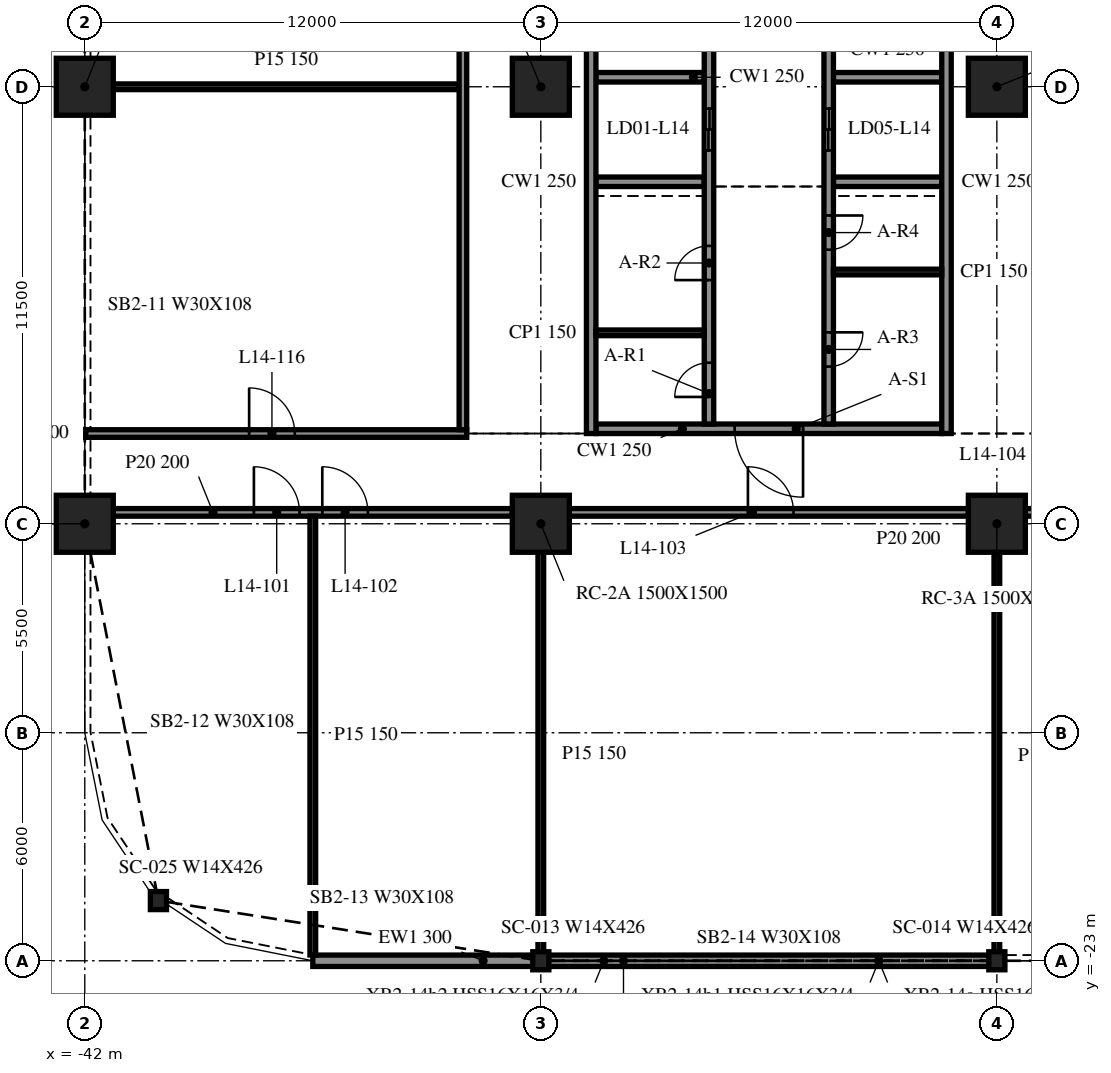
"""IFC4 building model, lengths in metres.
Left out: names, types, materials, properties, quantities, classifications, styles, units other than length and angle.
Written with IfcOpenShell. Run it as: python <this file> out.ifc"""

import sys

from ifc_helpers import new_model, si_unit, direction, frame, frame_2d, origin, origin_2d, place, context, subcontext, project, spatial, rectangle, i_section, extrude, element, fill, save


model = new_model("IFC4")
c1 = context("Model", 3, precision=1e-05, world=origin(), true_north=direction((0.0, 1.0)))
c2 = subcontext(c1, "Body", "Model", "MODEL_VIEW")
j1 = project(units=[si_unit("LENGTHUNIT", "METRE"), si_unit("PLANEANGLEUNIT", "RADIAN")], contexts=[c1])
p1 = place(None, origin())
s1 = spatial("IfcSite", under=j1, at=p1, CompositionType="ELEMENT")
p2 = place(p1, origin())
s2 = spatial("IfcBuilding", under=s1, at=p2, CompositionType="ELEMENT")
p3 = place(p2, frame((0.0, 0.0, 63.2)))
s3 = spatial("IfcBuildingStorey", under=s2, at=p3, CompositionType="ELEMENT", Elevation=63.2)
for number, where, z_axis, x_axis in (
    (1, (-42.0, -11.5, -0.34), (0.0, 0.0, 1.0), (1.0, 0.0, 0.0)),
    (2, (-42.0, 0.0, -0.34), (0.0, 0.0, 1.0), (1.0, 0.0, 0.0)),
    (3, (-30.0, -11.5, -0.34), (0.0, 0.0, 1.0), (1.0, 0.0, 0.0)),
    (4, (-30.0, 0.0, -0.34), (0.0, 0.0, 1.0), (1.0, 0.0, 0.0)),
    (5, (-18.0, -11.5, -0.34), (0.0, 0.0, 1.0), (1.0, 0.0, 0.0)),
    (6, (-18.0, 0.0, -0.34), (0.0, 0.0, 1.0), (1.0, 0.0, 0.0)),
):
    element("IfcColumn", number, at=place(p3, frame(where, z_axis=z_axis, x_axis=x_axis)), inside=s3, PredefinedType="COLUMN", context=c2, shape_type="SweptSolid", body=[
        extrude(rectangle(XDim=1.5, YDim=1.5, at=origin_2d()), origin(), (0.0, 0.0, 1.0), 4.3),
    ])
for number, where, z_axis, x_axis in (
    (7, (-40.062, -21.416, -0.34), (0.0, 0.0, 1.0), (1.0, 0.0, 0.0)),
    (8, (-30.0, -23.0, -0.34), (0.0, 0.0, 1.0), (1.0, 0.0, 0.0)),
    (9, (-18.0, -23.0, -0.34), (0.0, 0.0, 1.0), (1.0, 0.0, 0.0)),
):
    element("IfcColumn", number, at=place(p3, frame(where, z_axis=z_axis, x_axis=x_axis)), inside=s3, PredefinedType="COLUMN", context=c2, shape_type="SweptSolid", body=[
        extrude(i_section(OverallWidth=0.424, OverallDepth=0.475, WebThickness=0.048, FlangeThickness=0.077, at=origin_2d()), origin(), (0.0, 0.0, 1.0), 4.3),
    ])
p4 = place(p3, frame((-36.0, -23.0, 0.0), z_axis=(0.0, 0.0, 1.0), x_axis=(1.0, 0.0, 0.0)))
e10 = element("IfcWall", 10, at=p4, inside=s3, PredefinedType="NOTDEFINED", context=c2, shape_type="SweptSolid", body=[
    extrude(rectangle(XDim=5.976, YDim=0.3, at=frame_2d((2.988, 0.0))), origin(), (0.0, 0.0, 1.0), 3.203),
])
p5 = place(p3, frame((-29.976, -23.0, 0.0), z_axis=(0.0, 0.0, 1.0), x_axis=(1.0, 0.0, 0.0)))
e11 = element("IfcWall", 11, at=p5, inside=s3, PredefinedType="NOTDEFINED", context=c2, shape_type="SweptSolid", body=[
    extrude(rectangle(XDim=11.952, YDim=0.3, at=frame_2d((5.976, 0.0))), origin(), (0.0, 0.0, 1.0), 3.203),
])
for number, where, z_axis, x_axis in (
    (12, (-28.675, 15.125, 0.0), (0.0, 0.0, 1.0), (0.0, -1.0, 0.0)),
    (13, (-19.325, -9.125, 0.0), (0.0, 0.0, 1.0), (0.0, 1.0, 0.0)),
):
    element("IfcWall", number, at=place(p3, frame(where, z_axis=z_axis, x_axis=x_axis)), inside=s3, PredefinedType="SOLIDWALL", context=c2, shape_type="SweptSolid", body=[
        extrude(rectangle(XDim=24.25, YDim=0.25, at=frame_2d((12.125, 0.0))), origin(), (0.0, 0.0, 1.0), 3.96),
    ])
p6 = place(p3, frame((-19.45, -9.0, 0.0), z_axis=(0.0, 0.0, 1.0), x_axis=(-1.0, 0.0, 0.0)))
e14 = element("IfcWall", 14, at=p6, inside=s3, PredefinedType="SOLIDWALL", context=c2, shape_type="SweptSolid", body=[
    extrude(rectangle(XDim=9.1, YDim=0.25, at=frame_2d((4.55, 0.0))), origin(), (0.0, 0.0, 1.0), 3.96),
])
p7 = place(p6, frame((3.65, 0.0, 0.0)))
e15 = element("IfcOpeningElement", 15, at=p7, cuts=e14, PredefinedType="OPENING", context=c2, shape_type="SweptSolid", body=[
    extrude(rectangle(XDim=1.8, YDim=2.1, at=frame_2d((0.9, 1.05))), frame((0.0, 0.135, 0.0), z_axis=(0.0, -1.0, 0.0), x_axis=(1.0, 0.0, 0.0)), (0.0, 0.0, 1.0), 0.27),
])
p8 = place(p3, frame((-25.575, -8.875, 0.0), z_axis=(0.0, 0.0, 1.0), x_axis=(0.0, 1.0, 0.0)))
e16 = element("IfcWall", 16, at=p8, inside=s3, PredefinedType="SOLIDWALL", context=c2, shape_type="SweptSolid", body=[
    extrude(rectangle(XDim=17.5, YDim=0.25, at=frame_2d((8.75, 0.0))), origin(), (0.0, 0.0, 1.0), 3.96),
])
p9 = place(p8, frame((7.2, 0.0, 0.0)))
e17 = element("IfcOpeningElement", 17, at=p9, cuts=e16, PredefinedType="OPENING", context=c2, shape_type="SweptSolid", body=[
    extrude(rectangle(XDim=1.1, YDim=2.1, at=frame_2d((0.55, 1.05))), frame((0.0, 0.135, 0.0), z_axis=(0.0, -1.0, 0.0), x_axis=(1.0, 0.0, 0.0)), (0.0, 0.0, 1.0), 0.27),
])
p10 = place(p8, frame((9.95, 0.0, 0.0)))
e18 = element("IfcOpeningElement", 18, at=p10, cuts=e16, PredefinedType="OPENING", context=c2, shape_type="SweptSolid", body=[
    extrude(rectangle(XDim=1.1, YDim=2.1, at=frame_2d((0.55, 1.05))), frame((0.0, 0.135, 0.0), z_axis=(0.0, -1.0, 0.0), x_axis=(1.0, 0.0, 0.0)), (0.0, 0.0, 1.0), 0.27),
])
p11 = place(p8, frame((12.7, 0.0, 0.0)))
e19 = element("IfcOpeningElement", 19, at=p11, cuts=e16, PredefinedType="OPENING", context=c2, shape_type="SweptSolid", body=[
    extrude(rectangle(XDim=1.1, YDim=2.1, at=frame_2d((0.55, 1.05))), frame((0.0, 0.135, 0.0), z_axis=(0.0, -1.0, 0.0), x_axis=(1.0, 0.0, 0.0)), (0.0, 0.0, 1.0), 0.27),
])
p12 = place(p8, frame((15.45, 0.0, 0.0)))
e20 = element("IfcOpeningElement", 20, at=p12, cuts=e16, PredefinedType="OPENING", context=c2, shape_type="SweptSolid", body=[
    extrude(rectangle(XDim=1.1, YDim=2.1, at=frame_2d((0.55, 1.05))), frame((0.0, 0.135, 0.0), z_axis=(0.0, -1.0, 0.0), x_axis=(1.0, 0.0, 0.0)), (0.0, 0.0, 1.0), 0.27),
])
p13 = place(p8, frame((0.712, 0.0, 0.0)))
e21 = element("IfcOpeningElement", 21, at=p13, cuts=e16, PredefinedType="OPENING", context=c2, shape_type="SweptSolid", body=[
    extrude(rectangle(XDim=0.9, YDim=2.1, at=frame_2d((0.45, 1.05))), frame((0.0, 0.135, 0.0), z_axis=(0.0, -1.0, 0.0), x_axis=(1.0, 0.0, 0.0)), (0.0, 0.0, 1.0), 0.27),
])
p14 = place(p8, frame((3.788, 0.0, 0.0)))
e22 = element("IfcOpeningElement", 22, at=p14, cuts=e16, PredefinedType="OPENING", context=c2, shape_type="SweptSolid", body=[
    extrude(rectangle(XDim=0.9, YDim=2.1, at=frame_2d((0.45, 1.05))), frame((0.0, 0.135, 0.0), z_axis=(0.0, -1.0, 0.0), x_axis=(1.0, 0.0, 0.0)), (0.0, 0.0, 1.0), 0.27),
])
p15 = place(p3, frame((-22.425, 14.875, 0.0), z_axis=(0.0, 0.0, 1.0), x_axis=(0.0, -1.0, 0.0)))
e23 = element("IfcWall", 23, at=p15, inside=s3, PredefinedType="SOLIDWALL", context=c2, shape_type="SweptSolid", body=[
    extrude(rectangle(XDim=23.75, YDim=0.25, at=frame_2d((11.875, 0.0))), origin(), (0.0, 0.0, 1.0), 3.96),
])
p16 = place(p15, frame((15.45, 0.0, 0.0)))
e24 = element("IfcOpeningElement", 24, at=p16, cuts=e23, PredefinedType="OPENING", context=c2, shape_type="SweptSolid", body=[
    extrude(rectangle(XDim=1.1, YDim=2.1, at=frame_2d((0.55, 1.05))), frame((0.0, 0.135, 0.0), z_axis=(0.0, -1.0, 0.0), x_axis=(1.0, 0.0, 0.0)), (0.0, 0.0, 1.0), 0.27),
])
p17 = place(p15, frame((12.7, 0.0, 0.0)))
e25 = element("IfcOpeningElement", 25, at=p17, cuts=e23, PredefinedType="OPENING", context=c2, shape_type="SweptSolid", body=[
    extrude(rectangle(XDim=1.1, YDim=2.1, at=frame_2d((0.55, 1.05))), frame((0.0, 0.135, 0.0), z_axis=(0.0, -1.0, 0.0), x_axis=(1.0, 0.0, 0.0)), (0.0, 0.0, 1.0), 0.27),
])
p18 = place(p15, frame((21.337, 0.0, 0.0)))
e26 = element("IfcOpeningElement", 26, at=p18, cuts=e23, PredefinedType="OPENING", context=c2, shape_type="SweptSolid", body=[
    extrude(rectangle(XDim=0.9, YDim=2.1, at=frame_2d((0.45, 1.05))), frame((0.0, 0.135, 0.0), z_axis=(0.0, -1.0, 0.0), x_axis=(1.0, 0.0, 0.0)), (0.0, 0.0, 1.0), 0.27),
])
p19 = place(p15, frame((18.262, 0.0, 0.0)))
e27 = element("IfcOpeningElement", 27, at=p19, cuts=e23, PredefinedType="OPENING", context=c2, shape_type="SweptSolid", body=[
    extrude(rectangle(XDim=0.9, YDim=2.1, at=frame_2d((0.45, 1.05))), frame((0.0, 0.135, 0.0), z_axis=(0.0, -1.0, 0.0), x_axis=(1.0, 0.0, 0.0)), (0.0, 0.0, 1.0), 0.27),
])
p20 = place(p15, frame((4.387, 0.0, 0.0)))
e28 = element("IfcOpeningElement", 28, at=p20, cuts=e23, PredefinedType="OPENING", context=c2, shape_type="SweptSolid", body=[
    extrude(rectangle(XDim=0.9, YDim=2.1, at=frame_2d((0.45, 1.05))), frame((0.0, 0.135, 0.0), z_axis=(0.0, -1.0, 0.0), x_axis=(1.0, 0.0, 0.0)), (0.0, 0.0, 1.0), 0.27),
])
p21 = place(p15, frame((1.312, 0.0, 0.0)))
e29 = element("IfcOpeningElement", 29, at=p21, cuts=e23, PredefinedType="OPENING", context=c2, shape_type="SweptSolid", body=[
    extrude(rectangle(XDim=0.9, YDim=2.1, at=frame_2d((0.45, 1.05))), frame((0.0, 0.135, 0.0), z_axis=(0.0, -1.0, 0.0), x_axis=(1.0, 0.0, 0.0)), (0.0, 0.0, 1.0), 0.27),
])
for number, where, z_axis, x_axis in (
    (30, (-28.55, -2.5, 0.0), (0.0, 0.0, 1.0), (1.0, 0.0, 0.0)),
    (31, (-28.55, 0.25, 0.0), (0.0, 0.0, 1.0), (1.0, 0.0, 0.0)),
    (32, (-22.3, -2.5, 0.0), (0.0, 0.0, 1.0), (1.0, 0.0, 0.0)),
    (33, (-22.3, 0.25, 0.0), (0.0, 0.0, 1.0), (1.0, 0.0, 0.0)),
):
    element("IfcWall", number, at=place(p3, frame(where, z_axis=z_axis, x_axis=x_axis)), inside=s3, PredefinedType="SOLIDWALL", context=c2, shape_type="SweptSolid", body=[
        extrude(rectangle(XDim=2.85, YDim=0.25, at=frame_2d((1.425, 0.0))), origin(), (0.0, 0.0, 1.0), 3.96),
    ])
for number, where, z_axis, x_axis in (
    (34, (-28.55, -6.475, 0.0), (0.0, 0.0, 1.0), (1.0, 0.0, 0.0)),
    (35, (-22.3, -4.875, 0.0), (0.0, 0.0, 1.0), (1.0, 0.0, 0.0)),
):
    element("IfcWall", number, at=place(p3, frame(where, z_axis=z_axis, x_axis=x_axis)), inside=s3, PredefinedType="PARTITIONING", context=c2, shape_type="SweptSolid", body=[
        extrude(rectangle(XDim=2.85, YDim=0.15, at=frame_2d((1.425, 0.0))), origin(), (0.0, 0.0, 1.0), 3.96),
    ])
p22 = place(p3, frame((-41.25, -11.2, 0.0), z_axis=(0.0, 0.0, 1.0), x_axis=(1.0, 0.0, 0.0)))
e36 = element("IfcWall", 36, at=p22, inside=s3, PredefinedType="PARTITIONING", context=c2, shape_type="SweptSolid", body=[
    extrude(rectangle(XDim=10.5, YDim=0.2, at=frame_2d((5.25, 0.0))), origin(), (0.0, 0.0, 1.0), 3.96),
])
p23 = place(p22, frame((3.7, 0.0, 0.0)))
e37 = element("IfcOpeningElement", 37, at=p23, cuts=e36, PredefinedType="OPENING", context=c2, shape_type="SweptSolid", body=[
    extrude(rectangle(XDim=1.2, YDim=2.1, at=frame_2d((0.6, 1.05))), frame((0.0, 0.11, 0.0), z_axis=(0.0, -1.0, 0.0), x_axis=(1.0, 0.0, 0.0)), (0.0, 0.0, 1.0), 0.22),
])
p24 = place(p22, frame((5.5, 0.0, 0.0)))
e38 = element("IfcOpeningElement", 38, at=p24, cuts=e36, PredefinedType="OPENING", context=c2, shape_type="SweptSolid", body=[
    extrude(rectangle(XDim=1.2, YDim=2.1, at=frame_2d((0.6, 1.05))), frame((0.0, 0.11, 0.0), z_axis=(0.0, -1.0, 0.0), x_axis=(1.0, 0.0, 0.0)), (0.0, 0.0, 1.0), 0.22),
])
p25 = place(p3, frame((-29.25, -11.2, 0.0), z_axis=(0.0, 0.0, 1.0), x_axis=(1.0, 0.0, 0.0)))
e39 = element("IfcWall", 39, at=p25, inside=s3, PredefinedType="PARTITIONING", context=c2, shape_type="SweptSolid", body=[
    extrude(rectangle(XDim=10.5, YDim=0.2, at=frame_2d((5.25, 0.0))), origin(), (0.0, 0.0, 1.0), 3.96),
])
p26 = place(p25, frame((4.7, 0.0, 0.0)))
e40 = element("IfcOpeningElement", 40, at=p26, cuts=e39, PredefinedType="OPENING", context=c2, shape_type="SweptSolid", body=[
    extrude(rectangle(XDim=1.2, YDim=2.1, at=frame_2d((0.6, 1.05))), frame((0.0, 0.11, 0.0), z_axis=(0.0, -1.0, 0.0), x_axis=(1.0, 0.0, 0.0)), (0.0, 0.0, 1.0), 0.22),
])
p27 = place(p3, frame((-17.25, -11.2, 0.0), z_axis=(0.0, 0.0, 1.0), x_axis=(1.0, 0.0, 0.0)))
e41 = element("IfcWall", 41, at=p27, inside=s3, PredefinedType="PARTITIONING", context=c2, shape_type="SweptSolid", body=[
    extrude(rectangle(XDim=10.5, YDim=0.2, at=frame_2d((5.25, 0.0))), origin(), (0.0, 0.0, 1.0), 3.96),
])
p28 = place(p27, frame((0.9, 0.0, 0.0)))
e42 = element("IfcOpeningElement", 42, at=p28, cuts=e41, PredefinedType="OPENING", context=c2, shape_type="SweptSolid", body=[
    extrude(rectangle(XDim=1.0, YDim=2.1, at=frame_2d((0.5, 1.05))), frame((0.0, 0.11, 0.0), z_axis=(0.0, -1.0, 0.0), x_axis=(1.0, 0.0, 0.0)), (0.0, 0.0, 1.0), 0.22),
])
p29 = place(p27, frame((3.7, 0.0, 0.0)))
e43 = element("IfcOpeningElement", 43, at=p29, cuts=e41, PredefinedType="OPENING", context=c2, shape_type="SweptSolid", body=[
    extrude(rectangle(XDim=1.2, YDim=2.1, at=frame_2d((0.6, 1.05))), frame((0.0, 0.11, 0.0), z_axis=(0.0, -1.0, 0.0), x_axis=(1.0, 0.0, 0.0)), (0.0, 0.0, 1.0), 0.22),
])
p30 = place(p27, frame((5.5, 0.0, 0.0)))
e44 = element("IfcOpeningElement", 44, at=p30, cuts=e41, PredefinedType="OPENING", context=c2, shape_type="SweptSolid", body=[
    extrude(rectangle(XDim=1.2, YDim=2.1, at=frame_2d((0.6, 1.05))), frame((0.0, 0.11, 0.0), z_axis=(0.0, -1.0, 0.0), x_axis=(1.0, 0.0, 0.0)), (0.0, 0.0, 1.0), 0.22),
])
p31 = place(p3, frame((-41.975, -9.125, 0.0), z_axis=(0.0, 0.0, 1.0), x_axis=(1.0, 0.0, 0.0)))
e45 = element("IfcWall", 45, at=p31, inside=s3, PredefinedType="PARTITIONING", context=c2, shape_type="SweptSolid", body=[
    extrude(rectangle(XDim=10.025, YDim=0.2, at=frame_2d((5.013, 0.0))), origin(), (0.0, 0.0, 1.0), 3.96),
])
p32 = place(p31, frame((4.3, 0.0, 0.0)))
e46 = element("IfcOpeningElement", 46, at=p32, cuts=e45, PredefinedType="OPENING", context=c2, shape_type="SweptSolid", body=[
    extrude(rectangle(XDim=1.2, YDim=2.1, at=frame_2d((0.6, 1.05))), frame((0.0, 0.11, 0.0), z_axis=(0.0, -1.0, 0.0), x_axis=(1.0, 0.0, 0.0)), (0.0, 0.0, 1.0), 0.22),
])
p33 = place(p3, frame((-41.25, 0.0, 0.0), z_axis=(0.0, 0.0, 1.0), x_axis=(1.0, 0.0, 0.0)))
e47 = element("IfcWall", 47, at=p33, inside=s3, PredefinedType="PARTITIONING", context=c2, shape_type="SweptSolid", body=[
    extrude(rectangle(XDim=9.1, YDim=0.15, at=frame_2d((4.55, 0.0))), origin(), (0.0, 0.0, 1.0), 3.96),
])
p34 = place(p3, frame((-36.0, -22.847, 0.0), z_axis=(0.0, 0.0, 1.0), x_axis=(0.0, 1.0, 0.0)))
e48 = element("IfcWall", 48, at=p34, inside=s3, PredefinedType="PARTITIONING", context=c2, shape_type="SweptSolid", body=[
    extrude(rectangle(XDim=11.547, YDim=0.15, at=frame_2d((5.773, 0.0))), origin(), (0.0, 0.0, 1.0), 3.96),
])
p35 = place(p3, frame((-32.05, -9.025, 0.0), z_axis=(0.0, 0.0, 1.0), x_axis=(0.0, 1.0, 0.0)))
e49 = element("IfcWall", 49, at=p35, inside=s3, PredefinedType="PARTITIONING", context=c2, shape_type="SweptSolid", body=[
    extrude(rectangle(XDim=24.05, YDim=0.2, at=frame_2d((12.025, 0.0))), origin(), (0.0, 0.0, 1.0), 3.96),
])
p36 = place(p3, frame((-30.0, -22.85, 0.0), z_axis=(0.0, 0.0, 1.0), x_axis=(0.0, 1.0, 0.0)))
e50 = element("IfcWall", 50, at=p36, inside=s3, PredefinedType="PARTITIONING", context=c2, shape_type="SweptSolid", body=[
    extrude(rectangle(XDim=10.6, YDim=0.15, at=frame_2d((5.3, 0.0))), origin(), (0.0, 0.0, 1.0), 3.96),
])
p37 = place(p3, frame((-18.0, -22.975, 0.0), z_axis=(0.0, 0.0, 1.0), x_axis=(0.0, 1.0, 0.0)))
e51 = element("IfcWall", 51, at=p37, inside=s3, PredefinedType="PARTITIONING", context=c2, shape_type="SweptSolid", body=[
    extrude(rectangle(XDim=10.725, YDim=0.15, at=frame_2d((5.363, 0.0))), origin(), (0.0, 0.0, 1.0), 3.96),
])
p38 = place(p7, origin())
e52 = element("IfcDoor", 52, at=p38, inside=s3, OperationType="DOUBLE_DOOR_SINGLE_SWING", PredefinedType="DOOR", context=c2, shape_type="SweptSolid", body=[
    extrude(rectangle(XDim=1.8, YDim=2.1, at=frame_2d((0.9, 1.05))), frame((0.0, 0.025, 0.0), z_axis=(0.0, -1.0, 0.0), x_axis=(1.0, 0.0, 0.0)), (0.0, 0.0, 1.0), 0.05),
])
fill(e15, e52)
p39 = place(p16, origin())
e53 = element("IfcDoor", 53, at=p39, inside=s3, OperationType="DOUBLE_DOOR_SLIDING", PredefinedType="DOOR", context=c2, shape_type="SweptSolid", body=[
    extrude(rectangle(XDim=1.1, YDim=2.1, at=frame_2d((0.55, 1.05))), frame((0.0, 0.025, 0.0), z_axis=(0.0, -1.0, 0.0), x_axis=(1.0, 0.0, 0.0)), (0.0, 0.0, 1.0), 0.05),
])
fill(e24, e53)
p40 = place(p9, origin())
e54 = element("IfcDoor", 54, at=p40, inside=s3, OperationType="DOUBLE_DOOR_SLIDING", PredefinedType="DOOR", context=c2, shape_type="SweptSolid", body=[
    extrude(rectangle(XDim=1.1, YDim=2.1, at=frame_2d((0.55, 1.05))), frame((0.0, 0.025, 0.0), z_axis=(0.0, -1.0, 0.0), x_axis=(1.0, 0.0, 0.0)), (0.0, 0.0, 1.0), 0.05),
])
fill(e17, e54)
p41 = place(p13, origin())
e55 = element("IfcDoor", 55, at=p41, inside=s3, OperationType="SINGLE_SWING_LEFT", PredefinedType="DOOR", context=c2, shape_type="SweptSolid", body=[
    extrude(rectangle(XDim=0.9, YDim=2.1, at=frame_2d((0.45, 1.05))), frame((0.0, 0.025, 0.0), z_axis=(0.0, -1.0, 0.0), x_axis=(1.0, 0.0, 0.0)), (0.0, 0.0, 1.0), 0.05),
])
fill(e21, e55)
p42 = place(p14, origin())
e56 = element("IfcDoor", 56, at=p42, inside=s3, OperationType="SINGLE_SWING_RIGHT", PredefinedType="DOOR", context=c2, shape_type="SweptSolid", body=[
    extrude(rectangle(XDim=0.9, YDim=2.1, at=frame_2d((0.45, 1.05))), frame((0.0, 0.025, 0.0), z_axis=(0.0, -1.0, 0.0), x_axis=(1.0, 0.0, 0.0)), (0.0, 0.0, 1.0), 0.05),
])
fill(e22, e56)
p43 = place(p18, origin())
e57 = element("IfcDoor", 57, at=p43, inside=s3, OperationType="SINGLE_SWING_LEFT", PredefinedType="DOOR", context=c2, shape_type="SweptSolid", body=[
    extrude(rectangle(XDim=0.9, YDim=2.1, at=frame_2d((0.45, 1.05))), frame((0.0, 0.025, 0.0), z_axis=(0.0, -1.0, 0.0), x_axis=(1.0, 0.0, 0.0)), (0.0, 0.0, 1.0), 0.05),
])
fill(e26, e57)
p44 = place(p19, origin())
e58 = element("IfcDoor", 58, at=p44, inside=s3, OperationType="SINGLE_SWING_RIGHT", PredefinedType="DOOR", context=c2, shape_type="SweptSolid", body=[
    extrude(rectangle(XDim=0.9, YDim=2.1, at=frame_2d((0.45, 1.05))), frame((0.0, 0.025, 0.0), z_axis=(0.0, -1.0, 0.0), x_axis=(1.0, 0.0, 0.0)), (0.0, 0.0, 1.0), 0.05),
])
fill(e27, e58)
p45 = place(p23, origin())
e59 = element("IfcDoor", 59, at=p45, inside=s3, OperationType="SINGLE_SWING_RIGHT", PredefinedType="DOOR", context=c2, shape_type="SweptSolid", body=[
    extrude(rectangle(XDim=1.2, YDim=2.1, at=frame_2d((0.6, 1.05))), frame((0.0, 0.025, 0.0), z_axis=(0.0, -1.0, 0.0), x_axis=(1.0, 0.0, 0.0)), (0.0, 0.0, 1.0), 0.05),
])
fill(e37, e59)
p46 = place(p24, origin())
e60 = element("IfcDoor", 60, at=p46, inside=s3, OperationType="SINGLE_SWING_LEFT", PredefinedType="DOOR", context=c2, shape_type="SweptSolid", body=[
    extrude(rectangle(XDim=1.2, YDim=2.1, at=frame_2d((0.6, 1.05))), frame((0.0, 0.025, 0.0), z_axis=(0.0, -1.0, 0.0), x_axis=(1.0, 0.0, 0.0)), (0.0, 0.0, 1.0), 0.05),
])
fill(e38, e60)
p47 = place(p26, origin())
e61 = element("IfcDoor", 61, at=p47, inside=s3, OperationType="SINGLE_SWING_LEFT", PredefinedType="DOOR", context=c2, shape_type="SweptSolid", body=[
    extrude(rectangle(XDim=1.2, YDim=2.1, at=frame_2d((0.6, 1.05))), frame((0.0, 0.025, 0.0), z_axis=(0.0, -1.0, 0.0), x_axis=(1.0, 0.0, 0.0)), (0.0, 0.0, 1.0), 0.05),
])
fill(e40, e61)
p48 = place(p32, origin())
e62 = element("IfcDoor", 62, at=p48, inside=s3, OperationType="SINGLE_SWING_LEFT", PredefinedType="DOOR", context=c2, shape_type="SweptSolid", body=[
    extrude(rectangle(XDim=1.2, YDim=2.1, at=frame_2d((0.6, 1.05))), frame((0.0, 0.025, 0.0), z_axis=(0.0, -1.0, 0.0), x_axis=(1.0, 0.0, 0.0)), (0.0, 0.0, 1.0), 0.05),
])
fill(e46, e62)
save(model, sys.argv[1])
